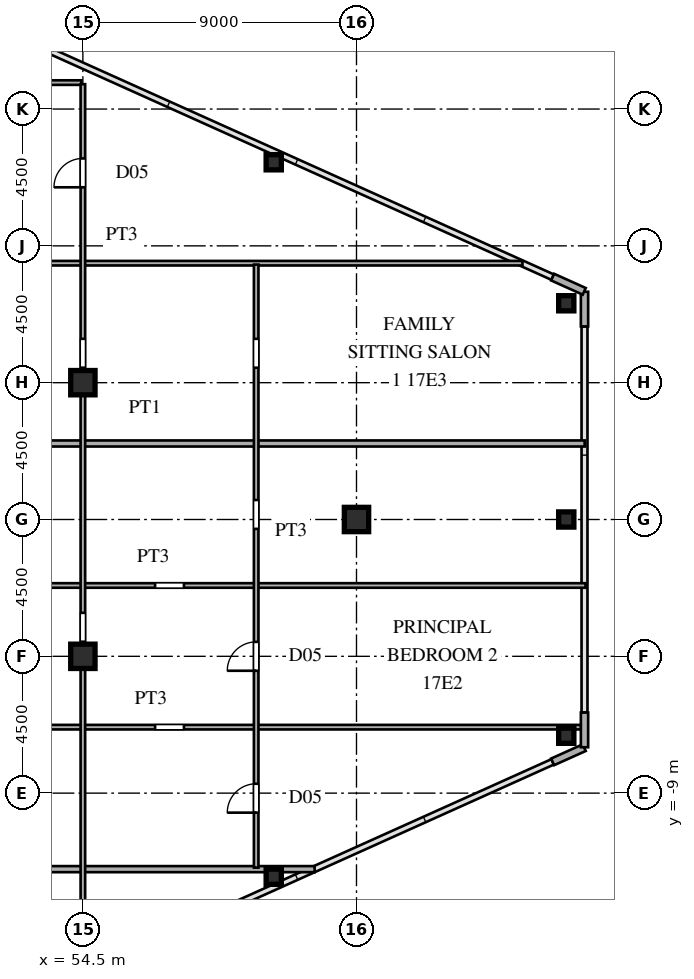
"""IFC4 building model, lengths in metres.
Left out: names, types, materials, properties, quantities, classifications, styles, units other than length and angle.
Written with IfcOpenShell. Run it as: python <this file> out.ifc"""

import sys

from ifc_helpers import new_model, si_unit, direction, frame, frame_2d, origin, origin_2d, place, context, subcontext, project, spatial, rectangle, hollow_rectangle, i_section, extrude, source, transform, mapped, element, fill, save


model = new_model("IFC4")
c1 = context("Model", 3, precision=1e-05, world=origin(), true_north=direction((0.0, 1.0)))
c2 = subcontext(c1, "Body", "Model", "MODEL_VIEW")
j1 = project(units=[si_unit("LENGTHUNIT", "METRE"), si_unit("PLANEANGLEUNIT", "RADIAN")], contexts=[c1])
p1 = place(None, origin())
s1 = spatial("IfcSite", under=j1, at=p1, CompositionType="ELEMENT")
p2 = place(p1, origin())
s2 = spatial("IfcBuilding", under=s1, at=p2, CompositionType="ELEMENT")
p3 = place(p2, frame((0.0, 0.0, 65.7)))
s3 = spatial("IfcBuildingStorey", under=s2, at=p3, CompositionType="ELEMENT", Elevation=65.7)
m1 = source(origin(), c2, "Body", "SweptSolid", [
    extrude(i_section(OverallWidth=0.8, OverallDepth=0.8, WebThickness=0.032, FlangeThickness=0.05, at=origin_2d()), origin(), (0.0, 0.0, 1.0), 3.6),
])
for number, where, z_axis, x_axis in (
    (1, (54.5, -4.5, 0.0), (0.0, 0.0, 1.0), (1.0, 0.0, 0.0)),
    (2, (54.5, 4.5, 0.0), (0.0, 0.0, 1.0), (1.0, 0.0, 0.0)),
    (3, (63.5, 0.0, 0.0), (0.0, 0.0, 1.0), (1.0, 0.0, 0.0)),
):
    element("IfcColumn", number, at=place(p3, frame(where, z_axis=z_axis, x_axis=x_axis)), inside=s3, PredefinedType="COLUMN", context=c2, shape_type="MappedRepresentation", body=[
        mapped(m1, transform((0.0, 0.0, 0.0), scale=1.0)),
    ])
m2 = source(origin(), c2, "Body", "SweptSolid", [
    extrude(hollow_rectangle(XDim=0.5, YDim=0.5, WallThickness=0.02, at=origin_2d()), origin(), (0.0, 0.0, 1.0), 3.6),
])
for number, where, z_axis, x_axis in (
    (4, (70.4, -7.112, 0.0), (0.0, 0.0, 1.0), (1.0, 0.0, 0.0)),
    (5, (70.4, 7.112, 0.0), (0.0, 0.0, 1.0), (1.0, 0.0, 0.0)),
    (6, (60.778, -11.749, 0.0), (0.0, 0.0, 1.0), (1.0, 0.0, 0.0)),
    (7, (60.778, 11.749, 0.0), (0.0, 0.0, 1.0), (1.0, 0.0, 0.0)),
    (8, (70.4, 0.0, 0.0), (0.0, 0.0, 1.0), (1.0, 0.0, 0.0)),
):
    element("IfcColumn", number, at=place(p3, frame(where, z_axis=z_axis, x_axis=x_axis)), inside=s3, PredefinedType="COLUMN", context=c2, shape_type="MappedRepresentation", body=[
        mapped(m2, transform((0.0, 0.0, 0.0), scale=1.0)),
    ])
for number, where, z_axis, x_axis in (
    (9, (69.951, -7.972, 0.0), (0.0, 0.0, 1.0), (0.912, 0.41, 0.0)),
    (10, (71.0, -7.49, 0.0), (0.0, 0.0, 1.0), (0.0, 1.0, 0.0)),
    (11, (71.0, 6.35, 0.0), (0.0, 0.0, 1.0), (0.0, 1.0, 0.0)),
    (12, (70.991, 7.504, 0.0), (0.0, 0.0, 1.0), (-0.912, 0.41, 0.0)),
):
    element("IfcWall", number, at=place(p3, frame(where, z_axis=z_axis, x_axis=x_axis)), inside=s3, PredefinedType="SOLIDWALL", context=c2, shape_type="SweptSolid", body=[
        extrude(rectangle(XDim=1.14, YDim=0.24, at=frame_2d((0.57, 0.0))), origin(), (0.0, 0.0, 1.0), 3.38),
    ])
p4 = place(p3, frame((39.78, -11.5, 0.0), z_axis=(0.0, 0.0, 1.0), x_axis=(1.0, 0.0, 0.0)))
e13 = element("IfcWall", 13, at=p4, inside=s3, PredefinedType="PARTITIONING", context=c2, shape_type="SweptSolid", body=[
    extrude(rectangle(XDim=22.343, YDim=0.2, at=frame_2d((11.171, 0.0))), origin(), (0.0, 0.0, 1.0), 3.38),
])
p5 = place(p3, frame((42.6, -6.83, 0.0), z_axis=(0.0, 0.0, 1.0), x_axis=(1.0, 0.0, 0.0)))
e14 = element("IfcWall", 14, at=p5, inside=s3, PredefinedType="PARTITIONING", context=c2, shape_type="SweptSolid", body=[
    extrude(rectangle(XDim=28.275, YDim=0.15, at=frame_2d((14.137, 0.0))), origin(), (0.0, 0.0, 1.0), 3.38),
])
p6 = place(p5, frame((5.45, 0.0, 0.0)))
e15 = element("IfcOpeningElement", 15, at=p6, cuts=e14, PredefinedType="OPENING", context=c2, shape_type="SweptSolid", body=[
    extrude(rectangle(XDim=0.95, YDim=2.15, at=frame_2d((0.475, 1.075))), frame((0.0, 0.085, 0.0), z_axis=(0.0, -1.0, 0.0), x_axis=(1.0, 0.0, 0.0)), (0.0, 0.0, 1.0), 0.17),
])
p7 = place(p5, frame((14.275, 0.0, 0.0)))
e16 = element("IfcOpeningElement", 16, at=p7, cuts=e14, PredefinedType="OPENING", context=c2, shape_type="SweptSolid", body=[
    extrude(rectangle(XDim=0.95, YDim=2.15, at=frame_2d((0.475, 1.075))), frame((0.0, 0.085, 0.0), z_axis=(0.0, -1.0, 0.0), x_axis=(1.0, 0.0, 0.0)), (0.0, 0.0, 1.0), 0.17),
])
p8 = place(p3, frame((42.6, -2.17, 0.0), z_axis=(0.0, 0.0, 1.0), x_axis=(1.0, 0.0, 0.0)))
e17 = element("IfcWall", 17, at=p8, inside=s3, PredefinedType="PARTITIONING", context=c2, shape_type="SweptSolid", body=[
    extrude(rectangle(XDim=28.435, YDim=0.15, at=frame_2d((14.217, 0.0))), origin(), (0.0, 0.0, 1.0), 3.38),
])
p9 = place(p8, frame((5.45, 0.0, 0.0)))
e18 = element("IfcOpeningElement", 18, at=p9, cuts=e17, PredefinedType="OPENING", context=c2, shape_type="SweptSolid", body=[
    extrude(rectangle(XDim=0.95, YDim=2.15, at=frame_2d((0.475, 1.075))), frame((0.0, 0.085, 0.0), z_axis=(0.0, -1.0, 0.0), x_axis=(1.0, 0.0, 0.0)), (0.0, 0.0, 1.0), 0.17),
])
p10 = place(p8, frame((14.275, 0.0, 0.0)))
e19 = element("IfcOpeningElement", 19, at=p10, cuts=e17, PredefinedType="OPENING", context=c2, shape_type="SweptSolid", body=[
    extrude(rectangle(XDim=0.95, YDim=2.15, at=frame_2d((0.475, 1.075))), frame((0.0, 0.085, 0.0), z_axis=(0.0, -1.0, 0.0), x_axis=(1.0, 0.0, 0.0)), (0.0, 0.0, 1.0), 0.17),
])
p11 = place(p3, frame((39.78, 2.5, 0.0), z_axis=(0.0, 0.0, 1.0), x_axis=(1.0, 0.0, 0.0)))
e20 = element("IfcWall", 20, at=p11, inside=s3, PredefinedType="PARTITIONING", context=c2, shape_type="SweptSolid", body=[
    extrude(rectangle(XDim=31.225, YDim=0.2, at=frame_2d((15.612, 0.0))), origin(), (0.0, 0.0, 1.0), 3.38),
])
p12 = place(p3, frame((42.6, 8.43, 0.0), z_axis=(0.0, 0.0, 1.0), x_axis=(1.0, 0.0, 0.0)))
e21 = element("IfcWall", 21, at=p12, inside=s3, PredefinedType="PARTITIONING", context=c2, shape_type="SweptSolid", body=[
    extrude(rectangle(XDim=26.359, YDim=0.15, at=frame_2d((13.179, 0.0))), origin(), (0.0, 0.0, 1.0), 3.38),
])
p13 = place(p12, frame((2.462, 0.0, 0.0)))
e22 = element("IfcOpeningElement", 22, at=p13, cuts=e21, PredefinedType="OPENING", context=c2, shape_type="SweptSolid", body=[
    extrude(rectangle(XDim=0.95, YDim=2.15, at=frame_2d((0.475, 1.075))), frame((0.0, 0.085, 0.0), z_axis=(0.0, -1.0, 0.0), x_axis=(1.0, 0.0, 0.0)), (0.0, 0.0, 1.0), 0.17),
])
p14 = place(p3, frame((42.6, 14.37, 0.0), z_axis=(0.0, 0.0, 1.0), x_axis=(1.0, 0.0, 0.0)))
e23 = element("IfcWall", 23, at=p14, inside=s3, PredefinedType="PARTITIONING", context=c2, shape_type="SweptSolid", body=[
    extrude(rectangle(XDim=11.85, YDim=0.15, at=frame_2d((5.925, 0.0))), origin(), (0.0, 0.0, 1.0), 3.38),
])
p15 = place(p14, frame((1.5, 0.0, 0.0)))
e24 = element("IfcOpeningElement", 24, at=p15, cuts=e23, PredefinedType="OPENING", context=c2, shape_type="SweptSolid", body=[
    extrude(rectangle(XDim=0.95, YDim=2.15, at=frame_2d((0.475, 1.075))), frame((0.0, 0.085, 0.0), z_axis=(0.0, -1.0, 0.0), x_axis=(1.0, 0.0, 0.0)), (0.0, 0.0, 1.0), 0.17),
])
p16 = place(p3, frame((54.5, -14.96, 0.0), z_axis=(0.0, 0.0, 1.0), x_axis=(0.0, 1.0, 0.0)))
e25 = element("IfcWall", 25, at=p16, inside=s3, PredefinedType="PARTITIONING", context=c2, shape_type="SweptSolid", body=[
    extrude(rectangle(XDim=29.278, YDim=0.15, at=frame_2d((14.639, 0.0))), origin(), (0.0, 0.0, 1.0), 2.68),
])
p17 = place(p16, frame((1.272, 0.0, 0.0)))
e26 = element("IfcOpeningElement", 26, at=p17, cuts=e25, PredefinedType="OPENING", context=c2, shape_type="SweptSolid", body=[
    extrude(rectangle(XDim=0.95, YDim=2.15, at=frame_2d((0.475, 1.075))), frame((0.0, 0.085, 0.0), z_axis=(0.0, -1.0, 0.0), x_axis=(1.0, 0.0, 0.0)), (0.0, 0.0, 1.0), 0.17),
])
p18 = place(p16, frame((10.94, 0.0, 0.0)))
e27 = element("IfcOpeningElement", 27, at=p18, cuts=e25, PredefinedType="OPENING", context=c2, shape_type="SweptSolid", body=[
    extrude(rectangle(XDim=0.95, YDim=2.15, at=frame_2d((0.475, 1.075))), frame((0.0, 0.085, 0.0), z_axis=(0.0, -1.0, 0.0), x_axis=(1.0, 0.0, 0.0)), (0.0, 0.0, 1.0), 0.17),
])
p19 = place(p16, frame((25.886, 0.0, 0.0)))
e28 = element("IfcOpeningElement", 28, at=p19, cuts=e25, PredefinedType="OPENING", context=c2, shape_type="SweptSolid", body=[
    extrude(rectangle(XDim=0.95, YDim=2.15, at=frame_2d((0.475, 1.075))), frame((0.0, 0.085, 0.0), z_axis=(0.0, -1.0, 0.0), x_axis=(1.0, 0.0, 0.0)), (0.0, 0.0, 1.0), 0.17),
])
p20 = place(p16, frame((19.952, 0.0, 0.0)))
e29 = element("IfcOpeningElement", 29, at=p20, cuts=e25, PredefinedType="OPENING", context=c2, shape_type="SweptSolid", body=[
    extrude(rectangle(XDim=0.95, YDim=2.15, at=frame_2d((0.475, 1.075))), frame((0.0, 0.085, 0.0), z_axis=(0.0, -1.0, 0.0), x_axis=(1.0, 0.0, 0.0)), (0.0, 0.0, 1.0), 0.17),
])
p21 = place(p3, frame((60.2, -11.45, 0.0), z_axis=(0.0, 0.0, 1.0), x_axis=(0.0, 1.0, 0.0)))
e30 = element("IfcWall", 30, at=p21, inside=s3, PredefinedType="PARTITIONING", context=c2, shape_type="SweptSolid", body=[
    extrude(rectangle(XDim=19.834, YDim=0.15, at=frame_2d((9.917, 0.0))), origin(), (0.0, 0.0, 1.0), 3.38),
])
p22 = place(p21, frame((1.808, 0.0, 0.0)))
e31 = element("IfcOpeningElement", 31, at=p22, cuts=e30, PredefinedType="OPENING", context=c2, shape_type="SweptSolid", body=[
    extrude(rectangle(XDim=0.95, YDim=2.15, at=frame_2d((0.475, 1.075))), frame((0.0, 0.085, 0.0), z_axis=(0.0, -1.0, 0.0), x_axis=(1.0, 0.0, 0.0)), (0.0, 0.0, 1.0), 0.17),
])
p23 = place(p21, frame((6.475, 0.0, 0.0)))
e32 = element("IfcOpeningElement", 32, at=p23, cuts=e30, PredefinedType="OPENING", context=c2, shape_type="SweptSolid", body=[
    extrude(rectangle(XDim=0.95, YDim=2.15, at=frame_2d((0.475, 1.075))), frame((0.0, 0.085, 0.0), z_axis=(0.0, -1.0, 0.0), x_axis=(1.0, 0.0, 0.0)), (0.0, 0.0, 1.0), 0.17),
])
p24 = place(p21, frame((11.142, 0.0, 0.0)))
e33 = element("IfcOpeningElement", 33, at=p24, cuts=e30, PredefinedType="OPENING", context=c2, shape_type="SweptSolid", body=[
    extrude(rectangle(XDim=0.95, YDim=2.15, at=frame_2d((0.475, 1.075))), frame((0.0, 0.085, 0.0), z_axis=(0.0, -1.0, 0.0), x_axis=(1.0, 0.0, 0.0)), (0.0, 0.0, 1.0), 0.17),
])
p25 = place(p21, frame((16.442, 0.0, 0.0)))
e34 = element("IfcOpeningElement", 34, at=p25, cuts=e30, PredefinedType="OPENING", context=c2, shape_type="SweptSolid", body=[
    extrude(rectangle(XDim=0.95, YDim=2.15, at=frame_2d((0.475, 1.075))), frame((0.0, 0.085, 0.0), z_axis=(0.0, -1.0, 0.0), x_axis=(1.0, 0.0, 0.0)), (0.0, 0.0, 1.0), 0.17),
])
m3 = source(origin(), c2, "Body", "SweptSolid", [
    extrude(rectangle(XDim=0.95, YDim=2.15, at=frame_2d((0.475, 1.075))), frame((0.0, 0.025, 0.0), z_axis=(0.0, -1.0, 0.0), x_axis=(1.0, 0.0, 0.0)), (0.0, 0.0, 1.0), 0.05),
])
p26 = place(p19, origin())
e35 = element("IfcDoor", 35, at=p26, inside=s3, OperationType="SINGLE_SWING_LEFT", PredefinedType="DOOR", context=c2, shape_type="MappedRepresentation", body=[
    mapped(m3, transform((0.0, 0.0, 0.0), scale=1.0)),
])
fill(e28, e35)
p27 = place(p22, origin())
e36 = element("IfcDoor", 36, at=p27, inside=s3, OperationType="SINGLE_SWING_LEFT", PredefinedType="DOOR", context=c2, shape_type="MappedRepresentation", body=[
    mapped(m3, transform((0.0, 0.0, 0.0), scale=1.0)),
])
fill(e31, e36)
p28 = place(p23, origin())
e37 = element("IfcDoor", 37, at=p28, inside=s3, OperationType="SINGLE_SWING_LEFT", PredefinedType="DOOR", context=c2, shape_type="MappedRepresentation", body=[
    mapped(m3, transform((0.0, 0.0, 0.0), scale=1.0)),
])
fill(e32, e37)
save(model, sys.argv[1])
